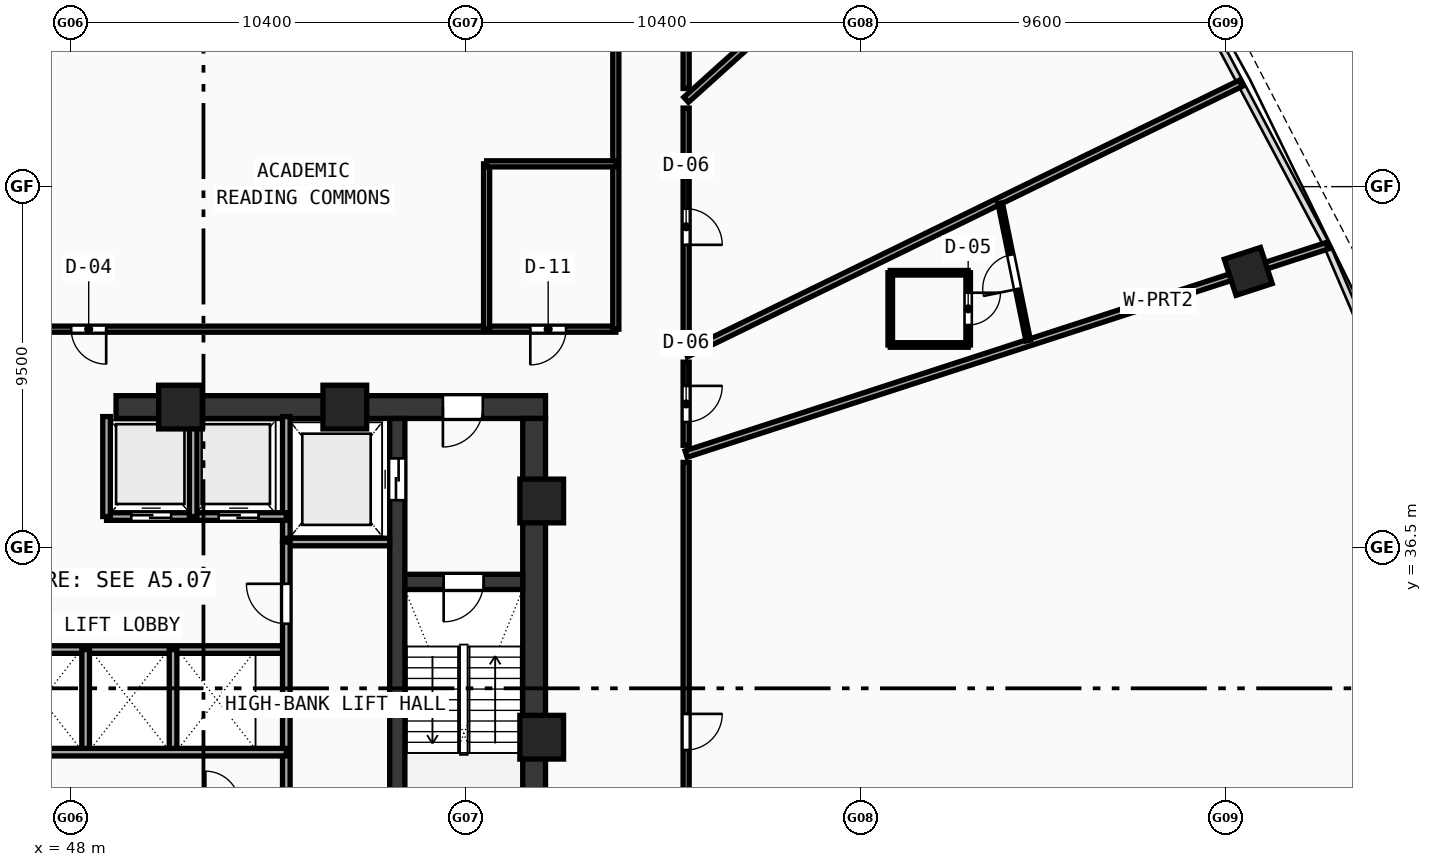
"""IFC4 building model, lengths in metres.
Left out: names, types, materials, properties, quantities, classifications, styles, units other than length and angle.
Written with IfcOpenShell. Run it as: python <this file> out.ifc"""

import sys

from ifc_helpers import new_model, si_unit, direction, frame, frame_2d, origin, origin_with_axes, origin_2d, place, context, subcontext, project, spatial, rectangle, hollow_rectangle, extrude, source, transform, mapped, element, fill, save


model = new_model("IFC4")
c1 = context("Model", 3, precision=1e-05, world=origin(), true_north=direction((0.0, 1.0)))
c2 = subcontext(c1, "Body", "Model", "MODEL_VIEW")
j1 = project(units=[si_unit("LENGTHUNIT", "METRE"), si_unit("PLANEANGLEUNIT", "RADIAN")], contexts=[c1])
p1 = place(None, origin())
s1 = spatial("IfcSite", under=j1, at=p1, CompositionType="ELEMENT")
p2 = place(p1, origin())
s2 = spatial("IfcBuilding", under=s1, at=p2, CompositionType="ELEMENT")
p3 = place(p2, frame((0.0, 0.0, 81.18)))
s3 = spatial("IfcBuildingStorey", under=s2, at=p3, CompositionType="ELEMENT", Elevation=81.18)
p4 = place(p3, frame((49.2, 40.2, 0.0), z_axis=(0.0, 0.0, 1.0), x_axis=(1.0, 0.0, 0.0)))
e1 = element("IfcWall", 1, at=p4, inside=s3, PredefinedType="SHEAR", context=c2, shape_type="SweptSolid", body=[
    extrude(rectangle(XDim=11.3, YDim=0.6, at=frame_2d((5.65, 0.0))), origin(), (0.0, 0.0, 1.0), 3.54),
])
p5 = place(p4, frame((8.6, 0.0, 0.0)))
e2 = element("IfcOpeningElement", 2, at=p5, cuts=e1, PredefinedType="OPENING", context=c2, shape_type="SweptSolid", body=[
    extrude(rectangle(XDim=1.05, YDim=2.1, at=frame_2d((0.525, 1.05))), frame((0.0, 0.31, 0.0), z_axis=(0.0, -1.0, 0.0), x_axis=(1.0, 0.0, 0.0)), (0.0, 0.0, 1.0), 0.62),
])
p6 = place(p3, frame((60.2, 27.8, 0.0), z_axis=(0.0, 0.0, 1.0), x_axis=(0.0, 1.0, 0.0)))
e3 = element("IfcWall", 3, at=p6, inside=s3, PredefinedType="SHEAR", context=c2, shape_type="SweptSolid", body=[
    extrude(rectangle(XDim=12.1, YDim=0.6, at=frame_2d((6.05, 0.0))), origin(), (0.0, 0.0, 1.0), 3.54),
])
p7 = place(p3, frame((56.6, 27.8, 0.0), z_axis=(0.0, 0.0, 1.0), x_axis=(0.0, 1.0, 0.0)))
e4 = element("IfcWall", 4, at=p7, inside=s3, PredefinedType="SHEAR", context=c2, shape_type="SweptSolid", body=[
    extrude(rectangle(XDim=12.1, YDim=0.4, at=frame_2d((6.05, 0.0))), origin(), (0.0, 0.0, 1.0), 3.54),
])
p8 = place(p7, frame((9.95, 0.0, 0.0)))
e5 = element("IfcOpeningElement", 5, at=p8, cuts=e4, PredefinedType="OPENING", context=c2, shape_type="SweptSolid", body=[
    extrude(rectangle(XDim=1.1, YDim=2.1, at=frame_2d((0.55, 1.05))), frame((0.0, 0.21, 0.0), z_axis=(0.0, -1.0, 0.0), x_axis=(1.0, 0.0, 0.0)), (0.0, 0.0, 1.0), 0.42),
])
p9 = place(p3, frame((56.8, 35.6, 0.0), z_axis=(0.0, 0.0, 1.0), x_axis=(1.0, 0.0, 0.0)))
e6 = element("IfcWall", 6, at=p9, inside=s3, PredefinedType="SHEAR", context=c2, shape_type="SweptSolid", body=[
    extrude(rectangle(XDim=3.1, YDim=0.4, at=frame_2d((1.55, 0.0))), origin(), (0.0, 0.0, 1.0), 3.54),
])
p10 = place(p9, frame((1.02, 0.0, 0.0)))
e7 = element("IfcOpeningElement", 7, at=p10, cuts=e6, PredefinedType="OPENING", context=c2, shape_type="SweptSolid", body=[
    extrude(rectangle(XDim=1.05, YDim=2.1, at=frame_2d((0.525, 1.05))), frame((0.0, 0.21, 0.0), z_axis=(0.0, -1.0, 0.0), x_axis=(1.0, 0.0, 0.0)), (0.0, 0.0, 1.0), 0.42),
])
m1 = source(origin(), c2, "Body", "SweptSolid", [
    extrude(hollow_rectangle(XDim=1.15, YDim=1.15, WallThickness=0.048, at=origin_2d()), origin(), (0.0, 0.0, 1.0), 3.8),
])
for number, where, z_axis, x_axis in (
    (8, (60.4, 31.513, -0.26), (0.0, 0.0, 1.0), (1.0, 0.0, 0.0)),
    (9, (60.4, 37.729, -0.26), (0.0, 0.0, 1.0), (1.0, 0.0, 0.0)),
    (10, (55.219, 40.2, -0.26), (0.0, 0.0, 1.0), (1.0, 0.0, 0.0)),
    (11, (50.894, 40.2, -0.26), (0.0, 0.0, 1.0), (1.0, 0.0, 0.0)),
):
    element("IfcColumn", number, at=place(p3, frame(where, z_axis=z_axis, x_axis=x_axis)), inside=s3, PredefinedType="COLUMN", context=c2, shape_type="MappedRepresentation", body=[
        mapped(m1, transform((0.0, 0.0, 0.0), scale=1.0)),
    ])
m2 = source(origin(), c2, "Body", "SweptSolid", [
    extrude(hollow_rectangle(XDim=1.0, YDim=1.0, WallThickness=0.042, at=origin_2d()), origin(), (0.0, 0.0, 1.0), 3.8),
])
p11 = place(p3, frame((78.991, 43.77, -0.26), z_axis=(0.0, 0.0, 1.0), x_axis=(-0.309016994375, 0.951056516295, 0.0)))
e12 = element("IfcColumn", 12, at=p11, inside=s3, PredefinedType="COLUMN", context=c2, shape_type="MappedRepresentation", body=[
    mapped(m2, transform((0.0, 0.0, 0.0), scale=1.0)),
])
p12 = place(p3, frame((53.68, 36.65, 0.0), z_axis=(0.0, 0.0, 1.0), x_axis=(0.0, 1.0, 0.0)))
e13 = element("IfcWall", 13, at=p12, inside=s3, PredefinedType="SOLIDWALL", context=c2, shape_type="SweptSolid", body=[
    extrude(rectangle(XDim=3.3, YDim=0.2, at=frame_2d((1.65, 0.0))), origin(), (0.0, 0.0, 1.0), 3.54),
])
p13 = place(p3, frame((53.68, 36.65, 0.0), z_axis=(0.0, 0.0, 1.0), x_axis=(1.0, 0.0, 0.0)))
e14 = element("IfcWall", 14, at=p13, inside=s3, PredefinedType="SOLIDWALL", context=c2, shape_type="SweptSolid", body=[
    extrude(rectangle(XDim=2.72, YDim=0.2, at=frame_2d((1.36, 0.0))), origin(), (0.0, 0.0, 1.0), 3.54),
])
p14 = place(p3, frame((48.95, 37.32, 0.0), z_axis=(0.0, 0.0, 1.0), x_axis=(1.0, 0.0, 0.0)))
e15 = element("IfcWall", 15, at=p14, inside=s3, PredefinedType="SOLIDWALL", context=c2, shape_type="SweptSolid", body=[
    extrude(rectangle(XDim=4.73, YDim=0.2, at=frame_2d((2.365, 0.0))), origin(), (0.0, 0.0, 1.0), 3.54),
])
p15 = place(p14, frame((0.65, 0.0, 0.0)))
e16 = element("IfcOpeningElement", 16, at=p15, cuts=e15, PredefinedType="OPENING", context=c2, shape_type="SweptSolid", body=[
    extrude(rectangle(XDim=1.05, YDim=2.1, at=frame_2d((0.525, 1.05))), frame((0.0, 0.11, 0.0), z_axis=(0.0, -1.0, 0.0), x_axis=(1.0, 0.0, 0.0)), (0.0, 0.0, 1.0), 0.22),
])
p16 = place(p14, frame((2.95, 0.0, 0.0)))
e17 = element("IfcOpeningElement", 17, at=p16, cuts=e15, PredefinedType="OPENING", context=c2, shape_type="SweptSolid", body=[
    extrude(rectangle(XDim=1.05, YDim=2.1, at=frame_2d((0.525, 1.05))), frame((0.0, 0.11, 0.0), z_axis=(0.0, -1.0, 0.0), x_axis=(1.0, 0.0, 0.0)), (0.0, 0.0, 1.0), 0.22),
])
for number, where, z_axis, x_axis in (
    (18, (48.95, 37.32, 0.0), (0.0, 0.0, 1.0), (0.0, 1.0, 0.0)),
    (19, (51.23, 37.32, 0.0), (0.0, 0.0, 1.0), (0.0, 1.0, 0.0)),
):
    element("IfcWall", number, at=place(p3, frame(where, z_axis=z_axis, x_axis=x_axis)), inside=s3, PredefinedType="SOLIDWALL", context=c2, shape_type="SweptSolid", body=[
        extrude(rectangle(XDim=2.63, YDim=0.2, at=frame_2d((1.315, 0.0))), origin(), (0.0, 0.0, 1.0), 3.54),
    ])
p17 = place(p3, frame((43.85, 33.82, 0.0), z_axis=(0.0, 0.0, 1.0), x_axis=(1.0, 0.0, 0.0)))
e20 = element("IfcWall", 20, at=p17, inside=s3, PredefinedType="SOLIDWALL", context=c2, shape_type="SweptSolid", body=[
    extrude(rectangle(XDim=9.83, YDim=0.2, at=frame_2d((4.915, 0.0))), origin(), (0.0, 0.0, 1.0), 3.54),
])
p18 = place(p3, frame((53.68, 27.6, 0.0), z_axis=(0.0, 0.0, 1.0), x_axis=(0.0, 1.0, 0.0)))
e21 = element("IfcWall", 21, at=p18, inside=s3, PredefinedType="SOLIDWALL", context=c2, shape_type="SweptSolid", body=[
    extrude(rectangle(XDim=9.05, YDim=0.2, at=frame_2d((4.525, 0.0))), origin(), (0.0, 0.0, 1.0), 3.54),
])
p19 = place(p18, frame((6.9, 0.0, 0.0)))
e22 = element("IfcOpeningElement", 22, at=p19, cuts=e21, PredefinedType="OPENING", context=c2, shape_type="SweptSolid", body=[
    extrude(rectangle(XDim=1.05, YDim=2.1, at=frame_2d((0.525, 1.05))), frame((0.0, 0.11, 0.0), z_axis=(0.0, -1.0, 0.0), x_axis=(1.0, 0.0, 0.0)), (0.0, 0.0, 1.0), 0.22),
])
for number, where, z_axis, x_axis in (
    (23, (48.4, 31.12, 0.0), (0.0, 0.0, 1.0), (0.0, 1.0, 0.0)),
    (24, (50.7, 31.12, 0.0), (0.0, 0.0, 1.0), (0.0, 1.0, 0.0)),
):
    element("IfcWall", number, at=place(p3, frame(where, z_axis=z_axis, x_axis=x_axis)), inside=s3, PredefinedType="SOLIDWALL", context=c2, shape_type="SweptSolid", body=[
        extrude(rectangle(XDim=2.7, YDim=0.2, at=frame_2d((1.35, 0.0))), origin(), (0.0, 0.0, 1.0), 3.54),
    ])
p20 = place(p3, frame((43.85, 31.12, 0.0), z_axis=(0.0, 0.0, 1.0), x_axis=(1.0, 0.0, 0.0)))
e25 = element("IfcWall", 25, at=p20, inside=s3, PredefinedType="SOLIDWALL", context=c2, shape_type="SweptSolid", body=[
    extrude(rectangle(XDim=9.83, YDim=0.2, at=frame_2d((4.915, 0.0))), origin(), (0.0, 0.0, 1.0), 3.54),
])
p21 = place(p3, frame((45.92, 42.25, 0.0), z_axis=(0.0, 0.0, 1.0), x_axis=(1.0, 0.0, 0.0)))
e26 = element("IfcWall", 26, at=p21, inside=s3, PredefinedType="PARTITIONING", context=c2, shape_type="SweptSolid", body=[
    extrude(rectangle(XDim=16.43, YDim=0.16, at=frame_2d((8.215, 0.0))), origin(), (0.0, 0.0, 1.0), 2.84),
])
p22 = place(p21, frame((2.1, 0.0, 0.0)))
e27 = element("IfcOpeningElement", 27, at=p22, cuts=e26, PredefinedType="OPENING", context=c2, shape_type="SweptSolid", body=[
    extrude(rectangle(XDim=0.92, YDim=2.1, at=frame_2d((0.46, 1.05))), frame((0.0, 0.09, 0.0), z_axis=(0.0, -1.0, 0.0), x_axis=(1.0, 0.0, 0.0)), (0.0, 0.0, 1.0), 0.18),
])
p23 = place(p21, frame((14.18, 0.0, 0.0)))
e28 = element("IfcOpeningElement", 28, at=p23, cuts=e26, PredefinedType="OPENING", context=c2, shape_type="SweptSolid", body=[
    extrude(rectangle(XDim=0.94, YDim=2.1, at=frame_2d((0.47, 1.05))), frame((0.0, 0.09, 0.0), z_axis=(0.0, -1.0, 0.0), x_axis=(1.0, 0.0, 0.0)), (0.0, 0.0, 1.0), 0.18),
])
p24 = place(p3, frame((62.35, 42.25, 0.0), z_axis=(0.0, 0.0, 1.0), x_axis=(0.0, 1.0, 0.0)))
e29 = element("IfcWall", 29, at=p24, inside=s3, PredefinedType="PARTITIONING", context=c2, shape_type="SweptSolid", body=[
    extrude(rectangle(XDim=7.55, YDim=0.16, at=frame_2d((3.775, 0.0))), origin(), (0.0, 0.0, 1.0), 2.84),
])
p25 = place(p3, frame((58.95, 42.25, 0.0), z_axis=(0.0, 0.0, 1.0), x_axis=(0.0, 1.0, 0.0)))
e30 = element("IfcWall", 30, at=p25, inside=s3, PredefinedType="PARTITIONING", context=c2, shape_type="SweptSolid", body=[
    extrude(rectangle(XDim=4.35, YDim=0.16, at=frame_2d((2.175, 0.0))), origin(), (0.0, 0.0, 1.0), 2.84),
])
p26 = place(p3, frame((58.95, 46.6, 0.0), z_axis=(0.0, 0.0, 1.0), x_axis=(1.0, 0.0, 0.0)))
e31 = element("IfcWall", 31, at=p26, inside=s3, PredefinedType="PARTITIONING", context=c2, shape_type="SweptSolid", body=[
    extrude(rectangle(XDim=3.4, YDim=0.16, at=frame_2d((1.7, 0.0))), origin(), (0.0, 0.0, 1.0), 2.84),
])
p27 = place(p3, frame((64.2, 38.964, 0.0), z_axis=(0.0, 0.0, 1.0), x_axis=(0.951054301474, 0.309023810812, 0.0)))
e32 = element("IfcWall", 32, at=p27, inside=s3, PredefinedType="PARTITIONING", context=c2, shape_type="SweptSolid", body=[
    extrude(rectangle(XDim=17.733, YDim=0.18, at=frame_2d((8.867, 0.0))), origin(), (0.0, 0.0, 1.0), 2.84),
])
p28 = place(p3, frame((64.2, 41.601, 0.0), z_axis=(0.0, 0.0, 1.0), x_axis=(0.898796049991, 0.438367038588, 0.0)))
e33 = element("IfcWall", 33, at=p28, inside=s3, PredefinedType="PARTITIONING", context=c2, shape_type="SweptSolid", body=[
    extrude(rectangle(XDim=16.234, YDim=0.18, at=frame_2d((8.117, 0.0))), origin(), (0.0, 0.0, 1.0), 2.84),
])
p29 = place(p3, frame((64.2, 48.287, 0.0), z_axis=(0.0, 0.0, 1.0), x_axis=(0.743149168899, 0.669125782469, 0.0)))
e34 = element("IfcWall", 34, at=p29, inside=s3, PredefinedType="PARTITIONING", context=c2, shape_type="SweptSolid", body=[
    extrude(rectangle(XDim=13.483, YDim=0.18, at=frame_2d((6.741, 0.0))), origin(), (0.0, 0.0, 1.0), 2.84),
])
p30 = place(p3, frame((64.2, 51.65, 0.0), z_axis=(0.0, 0.0, 1.0), x_axis=(0.0, -1.0, 0.0)))
e35 = element("IfcWall", 35, at=p30, inside=s3, PredefinedType="PARTITIONING", context=c2, shape_type="SweptSolid", body=[
    extrude(rectangle(XDim=3.067, YDim=0.16, at=frame_2d((1.534, 0.0))), origin(), (0.0, 0.0, 1.0), 3.54),
])
p31 = place(p30, frame((0.977, 0.0, 0.0)))
e36 = element("IfcOpeningElement", 36, at=p31, cuts=e35, PredefinedType="OPENING", context=c2, shape_type="SweptSolid", body=[
    extrude(rectangle(XDim=0.95, YDim=2.1, at=frame_2d((0.475, 1.05))), frame((0.0, 0.09, 0.0), z_axis=(0.0, -1.0, 0.0), x_axis=(1.0, 0.0, 0.0)), (0.0, 0.0, 1.0), 0.18),
])
p32 = place(p3, frame((64.2, 48.067, 0.0), z_axis=(0.0, 0.0, 1.0), x_axis=(0.0, -1.0, 0.0)))
e37 = element("IfcWall", 37, at=p32, inside=s3, PredefinedType="PARTITIONING", context=c2, shape_type="SweptSolid", body=[
    extrude(rectangle(XDim=6.221, YDim=0.16, at=frame_2d((3.11, 0.0))), origin(), (0.0, 0.0, 1.0), 2.84),
])
p33 = place(p32, frame((2.648, 0.0, 0.0)))
e38 = element("IfcOpeningElement", 38, at=p33, cuts=e37, PredefinedType="OPENING", context=c2, shape_type="SweptSolid", body=[
    extrude(rectangle(XDim=0.95, YDim=2.1, at=frame_2d((0.475, 1.05))), frame((0.0, 0.09, 0.0), z_axis=(0.0, -1.0, 0.0), x_axis=(1.0, 0.0, 0.0)), (0.0, 0.0, 1.0), 0.18),
])
p34 = place(p3, frame((64.2, 41.382, 0.0), z_axis=(0.0, 0.0, 1.0), x_axis=(0.0, -1.0, 0.0)))
e39 = element("IfcWall", 39, at=p34, inside=s3, PredefinedType="PARTITIONING", context=c2, shape_type="SweptSolid", body=[
    extrude(rectangle(XDim=2.187, YDim=0.16, at=frame_2d((1.093, 0.0))), origin(), (0.0, 0.0, 1.0), 3.54),
])
p35 = place(p34, frame((0.624, 0.0, 0.0)))
e40 = element("IfcOpeningElement", 40, at=p35, cuts=e39, PredefinedType="OPENING", context=c2, shape_type="SweptSolid", body=[
    extrude(rectangle(XDim=0.95, YDim=2.1, at=frame_2d((0.475, 1.05))), frame((0.0, 0.09, 0.0), z_axis=(0.0, -1.0, 0.0), x_axis=(1.0, 0.0, 0.0)), (0.0, 0.0, 1.0), 0.18),
])
p36 = place(p3, frame((64.2, 38.744, 0.0), z_axis=(0.0, 0.0, 1.0), x_axis=(0.0, -1.0, 0.0)))
e41 = element("IfcWall", 41, at=p36, inside=s3, PredefinedType="PARTITIONING", context=c2, shape_type="SweptSolid", body=[
    extrude(rectangle(XDim=13.944, YDim=0.16, at=frame_2d((6.972, 0.0))), origin(), (0.0, 0.0, 1.0), 2.84),
])
p37 = place(p36, frame((6.617, 0.0, 0.0)))
e42 = element("IfcOpeningElement", 42, at=p37, cuts=e41, PredefinedType="OPENING", context=c2, shape_type="SweptSolid", body=[
    extrude(rectangle(XDim=0.95, YDim=2.1, at=frame_2d((0.475, 1.05))), frame((0.0, 0.09, 0.0), z_axis=(0.0, -1.0, 0.0), x_axis=(1.0, 0.0, 0.0)), (0.0, 0.0, 1.0), 0.18),
])
p38 = place(p3, frame((69.571, 41.834, 0.0), z_axis=(0.0, 0.0, 1.0), x_axis=(1.0, 0.0, 0.0)))
e43 = element("IfcWall", 43, at=p38, inside=s3, PredefinedType="PARTITIONING", context=c2, shape_type="SweptSolid", body=[
    extrude(rectangle(XDim=2.05, YDim=0.12, at=frame_2d((1.025, 0.0))), origin(), (0.0, 0.0, 1.0), 3.54),
])
p39 = place(p3, frame((71.621, 41.834, 0.0), z_axis=(0.0, 0.0, 1.0), x_axis=(0.0, 1.0, 0.0)))
e44 = element("IfcWall", 44, at=p39, inside=s3, PredefinedType="PARTITIONING", context=c2, shape_type="SweptSolid", body=[
    extrude(rectangle(XDim=1.9, YDim=0.12, at=frame_2d((0.95, 0.0))), origin(), (0.0, 0.0, 1.0), 3.14),
])
p40 = place(p39, frame((0.525, 0.0, 0.0)))
e45 = element("IfcOpeningElement", 45, at=p40, cuts=e44, PredefinedType="OPENING", context=c2, shape_type="SweptSolid", body=[
    extrude(rectangle(XDim=0.85, YDim=2.1, at=frame_2d((0.425, 1.05))), frame((0.0, 0.07, 0.0), z_axis=(0.0, -1.0, 0.0), x_axis=(1.0, 0.0, 0.0)), (0.0, 0.0, 1.0), 0.14),
])
p41 = place(p3, frame((71.621, 43.734, 0.0), z_axis=(0.0, 0.0, 1.0), x_axis=(-1.0, 0.0, 0.0)))
e46 = element("IfcWall", 46, at=p41, inside=s3, PredefinedType="PARTITIONING", context=c2, shape_type="SweptSolid", body=[
    extrude(rectangle(XDim=2.05, YDim=0.12, at=frame_2d((1.025, 0.0))), origin(), (0.0, 0.0, 1.0), 3.54),
])
p42 = place(p3, frame((69.571, 43.734, 0.0), z_axis=(0.0, 0.0, 1.0), x_axis=(0.0, -1.0, 0.0)))
e47 = element("IfcWall", 47, at=p42, inside=s3, PredefinedType="PARTITIONING", context=c2, shape_type="SweptSolid", body=[
    extrude(rectangle(XDim=1.9, YDim=0.12, at=frame_2d((0.95, 0.0))), origin(), (0.0, 0.0, 1.0), 3.54),
])
p43 = place(p3, frame((73.2, 41.951, 0.0), z_axis=(0.0, 0.0, 1.0), x_axis=(-0.199717476268, 0.979853524601, 0.0)))
e48 = element("IfcWall", 48, at=p43, inside=s3, PredefinedType="PARTITIONING", context=c2, shape_type="SweptSolid", body=[
    extrude(rectangle(XDim=3.688, YDim=0.12, at=frame_2d((1.844, 0.0))), origin(), (0.0, 0.0, 1.0), 2.84),
])
p44 = place(p43, frame((1.384, 0.0, 0.0)))
e49 = element("IfcOpeningElement", 49, at=p44, cuts=e48, PredefinedType="OPENING", context=c2, shape_type="SweptSolid", body=[
    extrude(rectangle(XDim=0.92, YDim=2.1, at=frame_2d((0.46, 1.05))), frame((0.0, 0.07, 0.0), z_axis=(0.0, -1.0, 0.0), x_axis=(1.0, 0.0, 0.0)), (0.0, 0.0, 1.0), 0.14),
])
m3 = source(origin(), c2, "Body", "SweptSolid", [
    extrude(rectangle(XDim=1.05, YDim=2.1, at=frame_2d((0.525, 1.05))), frame((0.0, 0.025, 0.0), z_axis=(0.0, -1.0, 0.0), x_axis=(1.0, 0.0, 0.0)), (0.0, 0.0, 1.0), 0.05),
])
p45 = place(p10, frame((1.05, 0.0, 0.0), z_axis=(0.0, 0.0, 1.0), x_axis=(-1.0, 0.0, 0.0)))
e50 = element("IfcDoor", 50, at=p45, inside=s3, OperationType="SINGLE_SWING_RIGHT", PredefinedType="DOOR", context=c2, shape_type="MappedRepresentation", body=[
    mapped(m3, transform((0.0, 0.0, 0.0), scale=1.0)),
])
fill(e7, e50)
p46 = place(p5, frame((1.05, 0.0, 0.0), z_axis=(0.0, 0.0, 1.0), x_axis=(-1.0, 0.0, 0.0)))
e51 = element("IfcDoor", 51, at=p46, inside=s3, OperationType="SINGLE_SWING_RIGHT", PredefinedType="DOOR", context=c2, shape_type="MappedRepresentation", body=[
    mapped(m3, transform((0.0, 0.0, 0.0), scale=1.0)),
])
fill(e2, e51)
m4 = source(origin(), c2, "Body", "SweptSolid", [
    extrude(rectangle(XDim=1.1, YDim=2.1, at=frame_2d((0.55, 1.05))), frame((0.0, 0.025, 0.0), z_axis=(0.0, -1.0, 0.0), x_axis=(1.0, 0.0, 0.0)), (0.0, 0.0, 1.0), 0.05),
])
p47 = place(p8, origin_with_axes())
e52 = element("IfcDoor", 52, at=p47, inside=s3, OperationType="DOUBLE_DOOR_SLIDING", PredefinedType="DOOR", context=c2, shape_type="MappedRepresentation", body=[
    mapped(m4, transform((0.0, 0.0, 0.0), scale=1.0)),
])
fill(e5, e52)
p48 = place(p15, frame((1.05, 0.0, 0.0), z_axis=(0.0, 0.0, 1.0), x_axis=(-1.0, 0.0, 0.0)))
e53 = element("IfcDoor", 53, at=p48, inside=s3, OperationType="DOUBLE_DOOR_SLIDING", PredefinedType="DOOR", context=c2, shape_type="MappedRepresentation", body=[
    mapped(m3, transform((0.0, 0.0, 0.0), scale=1.0)),
])
fill(e16, e53)
p49 = place(p16, frame((1.05, 0.0, 0.0), z_axis=(0.0, 0.0, 1.0), x_axis=(-1.0, 0.0, 0.0)))
e54 = element("IfcDoor", 54, at=p49, inside=s3, OperationType="DOUBLE_DOOR_SLIDING", PredefinedType="DOOR", context=c2, shape_type="MappedRepresentation", body=[
    mapped(m3, transform((0.0, 0.0, 0.0), scale=1.0)),
])
fill(e17, e54)
p50 = place(p19, origin_with_axes())
e55 = element("IfcDoor", 55, at=p50, inside=s3, OperationType="SINGLE_SWING_RIGHT", PredefinedType="DOOR", context=c2, shape_type="MappedRepresentation", body=[
    mapped(m3, transform((0.0, 0.0, 0.0), scale=1.0)),
])
fill(e22, e55)
m5 = source(origin(), c2, "Body", "SweptSolid", [
    extrude(rectangle(XDim=0.92, YDim=2.1, at=frame_2d((0.46, 1.05))), frame((0.0, 0.025, 0.0), z_axis=(0.0, -1.0, 0.0), x_axis=(1.0, 0.0, 0.0)), (0.0, 0.0, 1.0), 0.05),
])
p51 = place(p22, frame((0.92, 0.0, 0.0), z_axis=(0.0, 0.0, 1.0), x_axis=(-1.0, 0.0, 0.0)))
e56 = element("IfcDoor", 56, at=p51, inside=s3, OperationType="SINGLE_SWING_LEFT", PredefinedType="DOOR", context=c2, shape_type="MappedRepresentation", body=[
    mapped(m5, transform((0.0, 0.0, 0.0), scale=1.0)),
])
fill(e27, e56)
m6 = source(origin(), c2, "Body", "SweptSolid", [
    extrude(rectangle(XDim=0.94, YDim=2.1, at=frame_2d((0.47, 1.05))), frame((0.0, 0.025, 0.0), z_axis=(0.0, -1.0, 0.0), x_axis=(1.0, 0.0, 0.0)), (0.0, 0.0, 1.0), 0.05),
])
p52 = place(p23, frame((0.94, 0.0, 0.0), z_axis=(0.0, 0.0, 1.0), x_axis=(-1.0, 0.0, 0.0)))
e57 = element("IfcDoor", 57, at=p52, inside=s3, OperationType="SINGLE_SWING_RIGHT", PredefinedType="DOOR", context=c2, shape_type="MappedRepresentation", body=[
    mapped(m6, transform((0.0, 0.0, 0.0), scale=1.0)),
])
fill(e28, e57)
m7 = source(origin(), c2, "Body", "SweptSolid", [
    extrude(rectangle(XDim=0.95, YDim=2.1, at=frame_2d((0.475, 1.05))), frame((0.0, 0.025, 0.0), z_axis=(0.0, -1.0, 0.0), x_axis=(1.0, 0.0, 0.0)), (0.0, 0.0, 1.0), 0.05),
])
p53 = place(p35, origin_with_axes())
e58 = element("IfcDoor", 58, at=p53, inside=s3, OperationType="SINGLE_SWING_LEFT", PredefinedType="DOOR", context=c2, shape_type="MappedRepresentation", body=[
    mapped(m7, transform((0.0, 0.0, 0.0), scale=1.0)),
])
fill(e40, e58)
m8 = source(origin(), c2, "Body", "SweptSolid", [
    extrude(rectangle(XDim=0.85, YDim=2.1, at=frame_2d((0.425, 1.05))), frame((0.0, 0.025, 0.0), z_axis=(0.0, -1.0, 0.0), x_axis=(1.0, 0.0, 0.0)), (0.0, 0.0, 1.0), 0.05),
])
p54 = place(p40, frame((0.85, 0.0, 0.0), z_axis=(0.0, 0.0, 1.0), x_axis=(-1.0, 0.0, 0.0)))
e59 = element("IfcDoor", 59, at=p54, inside=s3, OperationType="SINGLE_SWING_LEFT", PredefinedType="DOOR", context=c2, shape_type="MappedRepresentation", body=[
    mapped(m8, transform((0.0, 0.0, 0.0), scale=1.0)),
])
fill(e45, e59)
p55 = place(p44, origin_with_axes())
e60 = element("IfcDoor", 60, at=p55, inside=s3, OperationType="SINGLE_SWING_LEFT", PredefinedType="DOOR", context=c2, shape_type="MappedRepresentation", body=[
    mapped(m5, transform((0.0, 0.0, 0.0), scale=1.0)),
])
fill(e49, e60)
p56 = place(p33, origin_with_axes())
e61 = element("IfcDoor", 61, at=p56, inside=s3, OperationType="SINGLE_SWING_RIGHT", PredefinedType="DOOR", context=c2, shape_type="MappedRepresentation", body=[
    mapped(m7, transform((0.0, 0.0, 0.0), scale=1.0)),
])
fill(e38, e61)
p57 = place(p37, origin_with_axes())
e62 = element("IfcDoor", 62, at=p57, inside=s3, OperationType="SINGLE_SWING_LEFT", PredefinedType="DOOR", context=c2, shape_type="MappedRepresentation", body=[
    mapped(m7, transform((0.0, 0.0, 0.0), scale=1.0)),
])
fill(e42, e62)
save(model, sys.argv[1])
